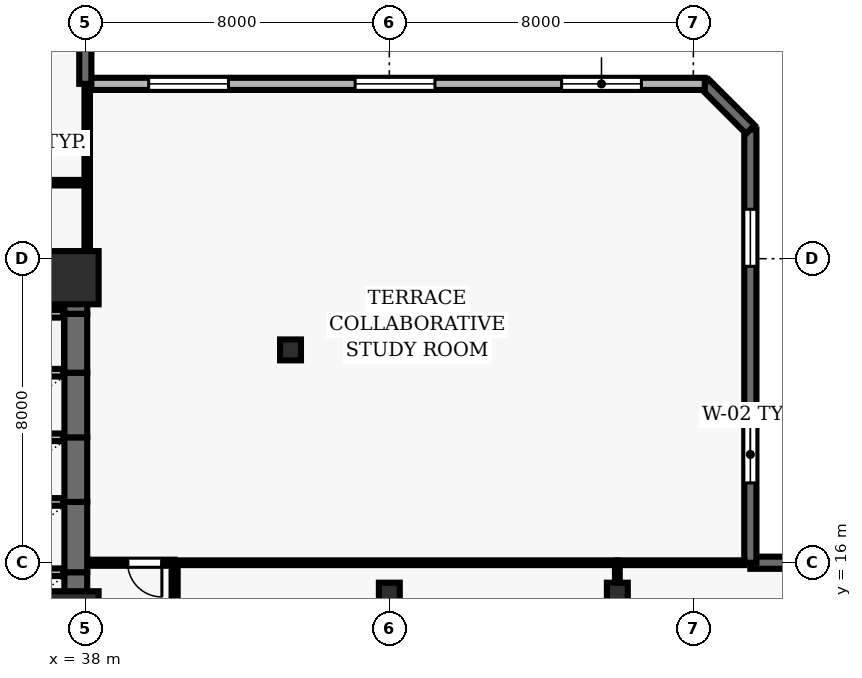
"""IFC4 building model, lengths in metres.
Left out: names, types, materials, properties, quantities, classifications, styles, units other than length and angle.
Written with IfcOpenShell. Run it as: python <this file> out.ifc"""

import sys

from ifc_helpers import new_model, si_unit, direction, frame, frame_2d, origin, origin_2d, place, context, subcontext, project, spatial, rectangle, hollow_rectangle, extrude, element, fill, save


model = new_model("IFC4")
c1 = context("Model", 3, precision=1e-05, world=origin(), true_north=direction((0.0, 1.0)))
c2 = subcontext(c1, "Body", "Model", "MODEL_VIEW")
j1 = project(units=[si_unit("LENGTHUNIT", "METRE"), si_unit("PLANEANGLEUNIT", "RADIAN")], contexts=[c1])
p1 = place(None, origin())
s1 = spatial("IfcSite", under=j1, at=p1, CompositionType="ELEMENT")
p2 = place(p1, origin())
s2 = spatial("IfcBuilding", under=s1, at=p2, CompositionType="ELEMENT")
p3 = place(p2, frame((0.0, 0.0, 38.8)))
s3 = spatial("IfcBuildingStorey", under=s2, at=p3, CompositionType="ELEMENT", Elevation=38.8)
for number, where, z_axis, x_axis in (
    (1, (37.65, 14.55, 0.0), (0.0, 0.0, 1.0), (1.0, 0.0, 0.0)),
    (2, (37.65, 23.5, 0.0), (0.0, 0.0, 1.0), (1.0, 0.0, 0.0)),
):
    element("IfcColumn", number, at=place(p3, frame(where, z_axis=z_axis, x_axis=x_axis)), inside=s3, PredefinedType="COLUMN", context=c2, shape_type="SweptSolid", body=[
        extrude(rectangle(XDim=1.4, YDim=1.4, at=origin_2d()), origin(), (0.0, 0.0, 1.0), 3.9),
    ])
for number, where, z_axis, x_axis in (
    (3, (46.0, 15.2, 0.0), (0.0, 0.0, 1.0), (1.0, 0.0, 0.0)),
    (4, (52.0, 15.2, 0.0), (0.0, 0.0, 1.0), (1.0, 0.0, 0.0)),
    (5, (43.4, 21.6, 0.0), (0.0, 0.0, 1.0), (1.0, 0.0, 0.0)),
):
    element("IfcColumn", number, at=place(p3, frame(where, z_axis=z_axis, x_axis=x_axis)), inside=s3, PredefinedType="COLUMN", context=c2, shape_type="SweptSolid", body=[
        extrude(hollow_rectangle(XDim=0.55, YDim=0.55, WallThickness=0.025, at=origin_2d()), origin(), (0.0, 0.0, 1.0), 3.9),
    ])
p4 = place(p3, frame((73.5, 16.0, 0.0), z_axis=(0.0, 0.0, 1.0), x_axis=(-1.0, 0.0, 0.0)))
e6 = element("IfcWall", 6, at=p4, inside=s3, PredefinedType="SOLIDWALL", context=c2, shape_type="SweptSolid", body=[
    extrude(rectangle(XDim=18.0, YDim=0.32, at=frame_2d((9.0, 0.0))), origin(), (0.0, 0.0, 1.0), 3.69),
])
p5 = place(p4, frame((7.3, 0.0, 0.0)))
e7 = element("IfcOpeningElement", 7, at=p5, cuts=e6, PredefinedType="OPENING", context=c2, shape_type="SweptSolid", body=[
    extrude(rectangle(XDim=1.0, YDim=2.2, at=frame_2d((0.5, 1.1))), frame((0.0, 0.17, 0.0), z_axis=(0.0, -1.0, 0.0), x_axis=(1.0, 0.0, 0.0)), (0.0, 0.0, 1.0), 0.34),
])
p6 = place(p4, frame((2.4, 0.0, 0.9)))
e8 = element("IfcOpeningElement", 8, at=p6, cuts=e6, PredefinedType="OPENING", context=c2, shape_type="SweptSolid", body=[
    extrude(rectangle(XDim=1.2, YDim=1.6, at=frame_2d((0.6, 0.8))), frame((0.0, 0.17, 0.0), z_axis=(0.0, -1.0, 0.0), x_axis=(1.0, 0.0, 0.0)), (0.0, 0.0, 1.0), 0.34),
])
p7 = place(p4, frame((13.95, 0.0, 0.9)))
e9 = element("IfcOpeningElement", 9, at=p7, cuts=e6, PredefinedType="OPENING", context=c2, shape_type="SweptSolid", body=[
    extrude(rectangle(XDim=1.2, YDim=1.6, at=frame_2d((0.6, 0.8))), frame((0.0, 0.17, 0.0), z_axis=(0.0, -1.0, 0.0), x_axis=(1.0, 0.0, 0.0)), (0.0, 0.0, 1.0), 0.34),
])
p8 = place(p3, frame((55.5, 16.0, 0.0), z_axis=(0.0, 0.0, 1.0), x_axis=(0.0, 1.0, 0.0)))
e10 = element("IfcWall", 10, at=p8, inside=s3, PredefinedType="SOLIDWALL", context=c2, shape_type="SweptSolid", body=[
    extrude(rectangle(XDim=11.4, YDim=0.32, at=frame_2d((5.7, 0.0))), origin(), (0.0, 0.0, 1.0), 3.69),
])
p9 = place(p8, frame((2.1, 0.0, 0.9)))
e11 = element("IfcOpeningElement", 11, at=p9, cuts=e10, PredefinedType="OPENING", context=c2, shape_type="SweptSolid", body=[
    extrude(rectangle(XDim=1.5, YDim=1.6, at=frame_2d((0.75, 0.8))), frame((0.0, 0.17, 0.0), z_axis=(0.0, -1.0, 0.0), x_axis=(1.0, 0.0, 0.0)), (0.0, 0.0, 1.0), 0.34),
])
p10 = place(p8, frame((7.8, 0.0, 0.9)))
e12 = element("IfcOpeningElement", 12, at=p10, cuts=e10, PredefinedType="OPENING", context=c2, shape_type="SweptSolid", body=[
    extrude(rectangle(XDim=1.5, YDim=1.6, at=frame_2d((0.75, 0.8))), frame((0.0, 0.17, 0.0), z_axis=(0.0, -1.0, 0.0), x_axis=(1.0, 0.0, 0.0)), (0.0, 0.0, 1.0), 0.34),
])
p11 = place(p3, frame((55.5, 27.4, 0.0), z_axis=(0.0, 0.0, 1.0), x_axis=(-0.707034851297, 0.707178703759, 0.0)))
e13 = element("IfcWall", 13, at=p11, inside=s3, PredefinedType="SOLIDWALL", context=c2, shape_type="SweptSolid", body=[
    extrude(rectangle(XDim=1.697, YDim=0.32, at=frame_2d((0.849, 0.0))), origin(), (0.0, 0.0, 1.0), 3.69),
])
p12 = place(p3, frame((54.3, 28.6, 0.0), z_axis=(0.0, 0.0, 1.0), x_axis=(-1.0, 0.0, 0.0)))
e14 = element("IfcWall", 14, at=p12, inside=s3, PredefinedType="SOLIDWALL", context=c2, shape_type="SweptSolid", body=[
    extrude(rectangle(XDim=16.3, YDim=0.32, at=frame_2d((8.15, 0.0))), origin(), (0.0, 0.0, 1.0), 3.69),
])
p13 = place(p12, frame((1.667, 0.0, 0.9)))
e15 = element("IfcOpeningElement", 15, at=p13, cuts=e14, PredefinedType="OPENING", context=c2, shape_type="SweptSolid", body=[
    extrude(rectangle(XDim=2.1, YDim=1.6, at=frame_2d((1.05, 0.8))), frame((0.0, 0.17, 0.0), z_axis=(0.0, -1.0, 0.0), x_axis=(1.0, 0.0, 0.0)), (0.0, 0.0, 1.0), 0.34),
])
p14 = place(p12, frame((7.1, 0.0, 0.9)))
e16 = element("IfcOpeningElement", 16, at=p14, cuts=e14, PredefinedType="OPENING", context=c2, shape_type="SweptSolid", body=[
    extrude(rectangle(XDim=2.1, YDim=1.6, at=frame_2d((1.05, 0.8))), frame((0.0, 0.17, 0.0), z_axis=(0.0, -1.0, 0.0), x_axis=(1.0, 0.0, 0.0)), (0.0, 0.0, 1.0), 0.34),
])
p15 = place(p12, frame((12.533, 0.0, 0.9)))
e17 = element("IfcOpeningElement", 17, at=p15, cuts=e14, PredefinedType="OPENING", context=c2, shape_type="SweptSolid", body=[
    extrude(rectangle(XDim=2.1, YDim=1.6, at=frame_2d((1.05, 0.8))), frame((0.0, 0.17, 0.0), z_axis=(0.0, -1.0, 0.0), x_axis=(1.0, 0.0, 0.0)), (0.0, 0.0, 1.0), 0.34),
])
p16 = place(p3, frame((38.0, 28.6, 0.0), z_axis=(0.0, 0.0, 1.0), x_axis=(0.0, 1.0, 0.0)))
e18 = element("IfcWall", 18, at=p16, inside=s3, PredefinedType="SOLIDWALL", context=c2, shape_type="SweptSolid", body=[
    extrude(rectangle(XDim=22.9, YDim=0.32, at=frame_2d((11.45, 0.0))), origin(), (0.0, 0.0, 1.0), 3.69),
])
p17 = place(p16, frame((9.95, 0.0, 0.0)))
e19 = element("IfcOpeningElement", 19, at=p17, cuts=e18, PredefinedType="OPENING", context=c2, shape_type="SweptSolid", body=[
    extrude(rectangle(XDim=1.0, YDim=2.2, at=frame_2d((0.5, 1.1))), frame((0.0, 0.17, 0.0), z_axis=(0.0, -1.0, 0.0), x_axis=(1.0, 0.0, 0.0)), (0.0, 0.0, 1.0), 0.34),
])
p18 = place(p16, frame((2.112, 0.0, 0.9)))
e20 = element("IfcOpeningElement", 20, at=p18, cuts=e18, PredefinedType="OPENING", context=c2, shape_type="SweptSolid", body=[
    extrude(rectangle(XDim=2.4, YDim=1.6, at=frame_2d((1.2, 0.8))), frame((0.0, 0.17, 0.0), z_axis=(0.0, -1.0, 0.0), x_axis=(1.0, 0.0, 0.0)), (0.0, 0.0, 1.0), 0.34),
])
p19 = place(p16, frame((18.837, 0.0, 0.9)))
e21 = element("IfcOpeningElement", 21, at=p19, cuts=e18, PredefinedType="OPENING", context=c2, shape_type="SweptSolid", body=[
    extrude(rectangle(XDim=2.4, YDim=1.6, at=frame_2d((1.2, 0.8))), frame((0.0, 0.17, 0.0), z_axis=(0.0, -1.0, 0.0), x_axis=(1.0, 0.0, 0.0)), (0.0, 0.0, 1.0), 0.34),
])
p20 = place(p3, frame((37.75, 13.9, 0.0), z_axis=(0.0, 0.0, 1.0), x_axis=(0.0, 1.0, 0.0)))
e22 = element("IfcWall", 22, at=p20, inside=s3, PredefinedType="SHEAR", context=c2, shape_type="SweptSolid", body=[
    extrude(rectangle(XDim=1.85, YDim=0.6, at=frame_2d((0.925, 0.0))), origin(), (0.0, 0.0, 1.0), 3.69),
])
p21 = place(p3, frame((37.42, 15.75, 0.0), z_axis=(0.0, 0.0, 1.0), x_axis=(-1.0, 0.0, 0.0)))
e23 = element("IfcWall", 23, at=p21, inside=s3, PredefinedType="SOLIDWALL", context=c2, shape_type="SweptSolid", body=[
    extrude(rectangle(XDim=2.14, YDim=0.2, at=frame_2d((1.07, 0.0))), origin(), (0.0, 0.0, 1.0), 3.69),
])
p22 = place(p3, frame((37.75, 15.75, 0.0), z_axis=(0.0, 0.0, 1.0), x_axis=(0.0, 1.0, 0.0)))
e24 = element("IfcWall", 24, at=p22, inside=s3, PredefinedType="SHEAR", context=c2, shape_type="SweptSolid", body=[
    extrude(rectangle(XDim=1.85, YDim=0.6, at=frame_2d((0.925, 0.0))), origin(), (0.0, 0.0, 1.0), 3.69),
])
p23 = place(p3, frame((37.42, 17.6, 0.0), z_axis=(0.0, 0.0, 1.0), x_axis=(-1.0, 0.0, 0.0)))
e25 = element("IfcWall", 25, at=p23, inside=s3, PredefinedType="SOLIDWALL", context=c2, shape_type="SweptSolid", body=[
    extrude(rectangle(XDim=2.14, YDim=0.2, at=frame_2d((1.07, 0.0))), origin(), (0.0, 0.0, 1.0), 3.69),
])
p24 = place(p3, frame((37.75, 17.6, 0.0), z_axis=(0.0, 0.0, 1.0), x_axis=(0.0, 1.0, 0.0)))
e26 = element("IfcWall", 26, at=p24, inside=s3, PredefinedType="SHEAR", context=c2, shape_type="SweptSolid", body=[
    extrude(rectangle(XDim=1.7, YDim=0.6, at=frame_2d((0.85, 0.0))), origin(), (0.0, 0.0, 1.0), 3.69),
])
p25 = place(p3, frame((37.42, 19.3, 0.0), z_axis=(0.0, 0.0, 1.0), x_axis=(-1.0, 0.0, 0.0)))
e27 = element("IfcWall", 27, at=p25, inside=s3, PredefinedType="SOLIDWALL", context=c2, shape_type="SweptSolid", body=[
    extrude(rectangle(XDim=2.14, YDim=0.2, at=frame_2d((1.07, 0.0))), origin(), (0.0, 0.0, 1.0), 3.69),
])
p26 = place(p3, frame((37.75, 19.3, 0.0), z_axis=(0.0, 0.0, 1.0), x_axis=(0.0, 1.0, 0.0)))
e28 = element("IfcWall", 28, at=p26, inside=s3, PredefinedType="SHEAR", context=c2, shape_type="SweptSolid", body=[
    extrude(rectangle(XDim=1.7, YDim=0.6, at=frame_2d((0.85, 0.0))), origin(), (0.0, 0.0, 1.0), 3.69),
])
p27 = place(p3, frame((37.42, 21.0, 0.0), z_axis=(0.0, 0.0, 1.0), x_axis=(-1.0, 0.0, 0.0)))
e29 = element("IfcWall", 29, at=p27, inside=s3, PredefinedType="SOLIDWALL", context=c2, shape_type="SweptSolid", body=[
    extrude(rectangle(XDim=2.14, YDim=0.2, at=frame_2d((1.07, 0.0))), origin(), (0.0, 0.0, 1.0), 3.69),
])
p28 = place(p3, frame((37.75, 21.0, 0.0), z_axis=(0.0, 0.0, 1.0), x_axis=(0.0, 1.0, 0.0)))
e30 = element("IfcWall", 30, at=p28, inside=s3, PredefinedType="SHEAR", context=c2, shape_type="SweptSolid", body=[
    extrude(rectangle(XDim=1.55, YDim=0.6, at=frame_2d((0.775, 0.0))), origin(), (0.0, 0.0, 1.0), 3.69),
])
p29 = place(p3, frame((37.42, 22.55, 0.0), z_axis=(0.0, 0.0, 1.0), x_axis=(-1.0, 0.0, 0.0)))
e31 = element("IfcWall", 31, at=p29, inside=s3, PredefinedType="SOLIDWALL", context=c2, shape_type="SweptSolid", body=[
    extrude(rectangle(XDim=2.14, YDim=0.2, at=frame_2d((1.07, 0.0))), origin(), (0.0, 0.0, 1.0), 3.69),
])
p30 = place(p3, frame((37.75, 22.55, 0.0), z_axis=(0.0, 0.0, 1.0), x_axis=(0.0, 1.0, 0.0)))
e32 = element("IfcWall", 32, at=p30, inside=s3, PredefinedType="SHEAR", context=c2, shape_type="SweptSolid", body=[
    extrude(rectangle(XDim=1.5, YDim=0.6, at=frame_2d((0.75, 0.0))), origin(), (0.0, 0.0, 1.0), 3.69),
])
p31 = place(p3, frame((37.42, 24.05, 0.0), z_axis=(0.0, 0.0, 1.0), x_axis=(-1.0, 0.0, 0.0)))
e33 = element("IfcWall", 33, at=p31, inside=s3, PredefinedType="SOLIDWALL", context=c2, shape_type="SweptSolid", body=[
    extrude(rectangle(XDim=2.14, YDim=0.2, at=frame_2d((1.07, 0.0))), origin(), (0.0, 0.0, 1.0), 3.69),
])
p32 = place(p3, frame((35.15, 26.0, 0.0), z_axis=(0.0, 0.0, 1.0), x_axis=(1.0, 0.0, 0.0)))
e34 = element("IfcWall", 34, at=p32, inside=s3, PredefinedType="PARTITIONING", context=c2, shape_type="SweptSolid", body=[
    extrude(rectangle(XDim=2.7, YDim=0.145, at=frame_2d((1.35, 0.0))), origin(), (0.0, 0.0, 1.0), 3.69),
])
p33 = place(p3, frame((40.35, 16.0, 0.0), z_axis=(0.0, 0.0, 1.0), x_axis=(-1.0, 0.0, 0.0)))
e35 = element("IfcWall", 35, at=p33, inside=s3, PredefinedType="PARTITIONING", context=c2, shape_type="SweptSolid", body=[
    extrude(rectangle(XDim=2.27, YDim=0.16, at=frame_2d((1.135, 0.0))), origin(), (0.0, 0.0, 1.0), 3.69),
])
p34 = place(p33, frame((0.335, 0.0, 0.0)))
e36 = element("IfcOpeningElement", 36, at=p34, cuts=e35, PredefinedType="OPENING", context=c2, shape_type="SweptSolid", body=[
    extrude(rectangle(XDim=0.9, YDim=2.1, at=frame_2d((0.45, 1.05))), frame((0.0, 0.09, 0.0), z_axis=(0.0, -1.0, 0.0), x_axis=(1.0, 0.0, 0.0)), (0.0, 0.0, 1.0), 0.18),
])
p35 = place(p3, frame((52.0, 16.0, 0.0), z_axis=(0.0, 0.0, 1.0), x_axis=(1.0, 0.0, 0.0)))
e37 = element("IfcWall", 37, at=p35, inside=s3, PredefinedType="PARTITIONING", context=c2, shape_type="SweptSolid", body=[
    extrude(rectangle(XDim=3.345, YDim=0.125, at=frame_2d((1.672, 0.0))), origin(), (0.0, 0.0, 1.0), 3.39),
])
p36 = place(p3, frame((52.0, 16.0, 0.0), z_axis=(0.0, 0.0, 1.0), x_axis=(-1.0, 0.0, 0.0)))
e38 = element("IfcWall", 38, at=p36, inside=s3, PredefinedType="PARTITIONING", context=c2, shape_type="SweptSolid", body=[
    extrude(rectangle(XDim=11.65, YDim=0.125, at=frame_2d((5.825, 0.0))), origin(), (0.0, 0.0, 1.0), 3.69),
])
p37 = place(p3, frame((38.05, 28.445, 0.0), z_axis=(0.0, 0.0, 1.0), x_axis=(0.0, -1.0, 0.0)))
e39 = element("IfcWall", 39, at=p37, inside=s3, PredefinedType="PARTITIONING", context=c2, shape_type="SweptSolid", body=[
    extrude(rectangle(XDim=4.395, YDim=0.145, at=frame_2d((2.198, 0.0))), origin(), (0.0, 0.0, 1.0), 2.995),
])
p38 = place(p3, frame((40.35, 10.425, 0.0), z_axis=(0.0, 0.0, 1.0), x_axis=(0.0, 1.0, 0.0)))
e40 = element("IfcWall", 40, at=p38, inside=s3, PredefinedType="PARTITIONING", context=c2, shape_type="SweptSolid", body=[
    extrude(rectangle(XDim=5.5, YDim=0.16, at=frame_2d((2.75, 0.0))), origin(), (0.0, 0.0, 1.0), 3.227),
])
p39 = place(p3, frame((52.0, 10.425, 0.0), z_axis=(0.0, 0.0, 1.0), x_axis=(0.0, 1.0, 0.0)))
e41 = element("IfcWall", 41, at=p39, inside=s3, PredefinedType="PARTITIONING", context=c2, shape_type="SweptSolid", body=[
    extrude(rectangle(XDim=5.518, YDim=0.125, at=frame_2d((2.759, 0.0))), origin(), (0.0, 0.0, 1.0), 2.995),
])
p40 = place(p9, origin())
e42 = element("IfcWindow", 42, at=p40, inside=s3, PartitioningType="SINGLE_PANEL", PredefinedType="WINDOW", context=c2, shape_type="SweptSolid", body=[
    extrude(rectangle(XDim=1.5, YDim=1.6, at=frame_2d((0.75, 0.8))), frame((0.0, 0.03, 0.0), z_axis=(0.0, -1.0, 0.0), x_axis=(1.0, 0.0, 0.0)), (0.0, 0.0, 1.0), 0.06),
])
fill(e11, e42)
p41 = place(p10, origin())
e43 = element("IfcWindow", 43, at=p41, inside=s3, PartitioningType="SINGLE_PANEL", PredefinedType="WINDOW", context=c2, shape_type="SweptSolid", body=[
    extrude(rectangle(XDim=1.5, YDim=1.6, at=frame_2d((0.75, 0.8))), frame((0.0, 0.03, 0.0), z_axis=(0.0, -1.0, 0.0), x_axis=(1.0, 0.0, 0.0)), (0.0, 0.0, 1.0), 0.06),
])
fill(e12, e43)
p42 = place(p13, origin())
e44 = element("IfcWindow", 44, at=p42, inside=s3, PartitioningType="SINGLE_PANEL", PredefinedType="WINDOW", context=c2, shape_type="SweptSolid", body=[
    extrude(rectangle(XDim=2.1, YDim=1.6, at=frame_2d((1.05, 0.8))), frame((0.0, 0.03, 0.0), z_axis=(0.0, -1.0, 0.0), x_axis=(1.0, 0.0, 0.0)), (0.0, 0.0, 1.0), 0.06),
])
fill(e15, e44)
p43 = place(p14, origin())
e45 = element("IfcWindow", 45, at=p43, inside=s3, PartitioningType="SINGLE_PANEL", PredefinedType="WINDOW", context=c2, shape_type="SweptSolid", body=[
    extrude(rectangle(XDim=2.1, YDim=1.6, at=frame_2d((1.05, 0.8))), frame((0.0, 0.03, 0.0), z_axis=(0.0, -1.0, 0.0), x_axis=(1.0, 0.0, 0.0)), (0.0, 0.0, 1.0), 0.06),
])
fill(e16, e45)
p44 = place(p15, origin())
e46 = element("IfcWindow", 46, at=p44, inside=s3, PartitioningType="SINGLE_PANEL", PredefinedType="WINDOW", context=c2, shape_type="SweptSolid", body=[
    extrude(rectangle(XDim=2.1, YDim=1.6, at=frame_2d((1.05, 0.8))), frame((0.0, 0.03, 0.0), z_axis=(0.0, -1.0, 0.0), x_axis=(1.0, 0.0, 0.0)), (0.0, 0.0, 1.0), 0.06),
])
fill(e17, e46)
p45 = place(p34, origin())
e47 = element("IfcDoor", 47, at=p45, inside=s3, OperationType="SINGLE_SWING_LEFT", PredefinedType="DOOR", context=c2, shape_type="SweptSolid", body=[
    extrude(rectangle(XDim=0.9, YDim=2.1, at=frame_2d((0.45, 1.05))), frame((0.0, 0.025, 0.0), z_axis=(0.0, -1.0, 0.0), x_axis=(1.0, 0.0, 0.0)), (0.0, 0.0, 1.0), 0.05),
])
fill(e36, e47)
save(model, sys.argv[1])
